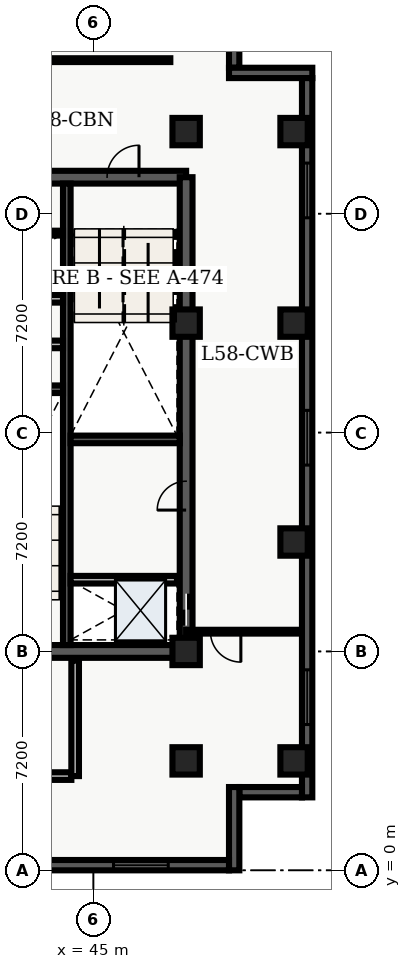
"""IFC4 building model, lengths in metres.
Left out: names, types, materials, properties, quantities, classifications, styles, units other than length and angle.
Written with IfcOpenShell. Run it as: python <this file> out.ifc"""

import sys

from ifc_helpers import new_model, entity, si_unit, converted_unit, direction, frame, origin_with_axes, origin_2d_with_axis, place, context, subcontext, project, spatial, polyline, rectangle, outline, extrude, element, fill, save


model = new_model("IFC4")
c1 = context("Model", 3, precision=1e-05, world=origin_with_axes(), true_north=direction((0.0, 1.0)))
c2 = subcontext(c1, "Body", "Model", "MODEL_VIEW")
j1 = project(units=[si_unit("LENGTHUNIT", "METRE"), converted_unit("PLANEANGLEUNIT", "DEGREE", entity("IfcPlaneAngleMeasure", 0.017), si_unit("PLANEANGLEUNIT", "RADIAN"), dimensions=[0, 0, 0, 0, 0, 0, 0])], contexts=[c1])
p1 = place(None, origin_with_axes())
s1 = spatial("IfcSite", under=j1, at=p1, CompositionType="ELEMENT")
p2 = place(p1, origin_with_axes())
s2 = spatial("IfcBuilding", under=s1, at=p2, CompositionType="ELEMENT")
p3 = place(p2, frame((0.0, 0.0, 236.4), z_axis=(0.0, 0.0, 1.0), x_axis=(1.0, 0.0, 0.0)))
s3 = spatial("IfcBuildingStorey", under=s2, at=p3, CompositionType="ELEMENT", Elevation=236.4)
p4 = place(p3, frame((40.2, 7.2, 0.0), z_axis=(0.0, 0.0, 1.0), x_axis=(1.0, 0.0, 0.0)))
e1 = element("IfcWall", 1, at=p4, inside=s3, PredefinedType="SHEAR", context=c2, shape_type="SweptSolid", body=[
    extrude(outline(polyline([(0.0, -0.21), (7.85, -0.21), (7.85, 0.21), (0.0, 0.21), (0.0, -0.21)])), origin_with_axes(), (0.0, 0.0, 1.0), 3.66),
])
p5 = place(p4, frame((2.175, 0.0, 0.0), z_axis=(0.0, 0.0, 1.0), x_axis=(1.0, 0.0, 0.0)))
e2 = element("IfcOpeningElement", 2, at=p5, cuts=e1, PredefinedType="OPENING", context=c2, shape_type="SweptSolid", body=[
    extrude(rectangle(XDim=1.05, YDim=0.44, at=origin_2d_with_axis()), origin_with_axes(), (0.0, 0.0, 1.0), 2.15),
])
p6 = place(p3, frame((40.2, 22.8, 0.0), z_axis=(0.0, 0.0, 1.0), x_axis=(1.0, 0.0, 0.0)))
e3 = element("IfcWall", 3, at=p6, inside=s3, PredefinedType="SHEAR", context=c2, shape_type="SweptSolid", body=[
    extrude(outline(polyline([(0.0, -0.21), (7.85, -0.21), (7.85, 0.21), (0.0, 0.21), (0.0, -0.21)])), origin_with_axes(), (0.0, 0.0, 1.0), 3.66),
])
p7 = place(p6, frame((5.775, 0.0, 0.0), z_axis=(0.0, 0.0, 1.0), x_axis=(1.0, 0.0, 0.0)))
e4 = element("IfcOpeningElement", 4, at=p7, cuts=e3, PredefinedType="OPENING", context=c2, shape_type="SweptSolid", body=[
    extrude(rectangle(XDim=1.05, YDim=0.44, at=origin_2d_with_axis()), origin_with_axes(), (0.0, 0.0, 1.0), 2.15),
])
p8 = place(p6, frame((2.15, 0.0, 0.0), z_axis=(0.0, 0.0, 1.0), x_axis=(1.0, 0.0, 0.0)))
e5 = element("IfcOpeningElement", 5, at=p8, cuts=e3, PredefinedType="OPENING", context=c2, shape_type="SweptSolid", body=[
    extrude(rectangle(XDim=0.9, YDim=0.44, at=origin_2d_with_axis()), origin_with_axes(), (0.0, 0.0, 1.0), 2.15),
])
p9 = place(p3, frame((48.05, 7.2, 0.0), z_axis=(0.0, 0.0, 1.0), x_axis=(0.0, 1.0, 0.0)))
e6 = element("IfcWall", 6, at=p9, inside=s3, PredefinedType="SHEAR", context=c2, shape_type="SweptSolid", body=[
    extrude(outline(polyline([(0.0, -0.21), (15.6, -0.21), (15.6, 0.21), (0.0, 0.21), (0.0, -0.21)])), origin_with_axes(), (0.0, 0.0, 1.0), 3.66),
])
p10 = place(p9, frame((1.375, 0.0, 0.0), z_axis=(0.0, 0.0, 1.0), x_axis=(1.0, 0.0, 0.0)))
e7 = element("IfcOpeningElement", 7, at=p10, cuts=e6, PredefinedType="OPENING", context=c2, shape_type="SweptSolid", body=[
    extrude(rectangle(XDim=1.05, YDim=0.44, at=origin_2d_with_axis()), origin_with_axes(), (0.0, 0.0, 1.0), 2.15),
])
p11 = place(p9, frame((5.125, 0.0, 0.0), z_axis=(0.0, 0.0, 1.0), x_axis=(1.0, 0.0, 0.0)))
e8 = element("IfcOpeningElement", 8, at=p11, cuts=e6, PredefinedType="OPENING", context=c2, shape_type="SweptSolid", body=[
    extrude(rectangle(XDim=0.95, YDim=0.44, at=origin_2d_with_axis()), origin_with_axes(), (0.0, 0.0, 1.0), 2.15),
])
p12 = place(p3, frame((44.125, 7.41, 0.0), z_axis=(0.0, 0.0, 1.0), x_axis=(0.0, 1.0, 0.0)))
e9 = element("IfcWall", 9, at=p12, inside=s3, PredefinedType="SHEAR", context=c2, shape_type="SweptSolid", body=[
    extrude(outline(polyline([(0.0, -0.125), (15.18, -0.125), (15.18, 0.125), (0.0, 0.125), (0.0, -0.125)])), origin_with_axes(), (0.0, 0.0, 1.0), 3.66),
])
for number, where, z_axis, x_axis in (
    (10, (40.41, 15.825, 0.0), (0.0, 0.0, 1.0), (1.0, 0.0, 0.0)),
    (11, (44.25, 14.175, 0.0), (0.0, 0.0, 1.0), (1.0, 0.0, 0.0)),
):
    element("IfcWall", number, at=place(p3, frame(where, z_axis=z_axis, x_axis=x_axis)), inside=s3, PredefinedType="SHEAR", context=c2, shape_type="SweptSolid", body=[
        extrude(outline(polyline([(0.0, -0.125), (3.59, -0.125), (3.59, 0.125), (0.0, 0.125), (0.0, -0.125)])), origin_with_axes(), (0.0, 0.0, 1.0), 3.66),
    ])
p13 = place(p3, frame((40.5, 17.3, 0.0), z_axis=(0.0, 0.0, 1.0), x_axis=(1.0, 0.0, 0.0)))
e12 = element("IfcWall", 12, at=p13, inside=s3, PredefinedType="SOLIDWALL", context=c2, shape_type="SweptSolid", body=[
    extrude(outline(polyline([(0.0, -0.125), (3.5, -0.125), (3.5, 0.125), (0.0, 0.125), (0.0, -0.125)])), origin_with_axes(), (0.0, 0.0, 1.0), 2.7),
])
p14 = place(p13, frame((2.4, 0.0, 0.0), z_axis=(0.0, 0.0, 1.0), x_axis=(1.0, 0.0, 0.0)))
e13 = element("IfcOpeningElement", 13, at=p14, cuts=e12, PredefinedType="OPENING", context=c2, shape_type="SweptSolid", body=[
    extrude(rectangle(XDim=0.9, YDim=0.27, at=origin_2d_with_axis()), origin_with_axes(), (0.0, 0.0, 1.0), 2.15),
])
p15 = place(p3, frame((40.5, 18.8, 0.0), z_axis=(0.0, 0.0, 1.0), x_axis=(1.0, 0.0, 0.0)))
e14 = element("IfcWall", 14, at=p15, inside=s3, PredefinedType="SOLIDWALL", context=c2, shape_type="SweptSolid", body=[
    extrude(outline(polyline([(0.0, -0.125), (3.5, -0.125), (3.5, 0.125), (0.0, 0.125), (0.0, -0.125)])), origin_with_axes(), (0.0, 0.0, 1.0), 2.7),
])
p16 = place(p3, frame((40.325, 3.1, 0.0), z_axis=(0.0, 0.0, 1.0), x_axis=(1.0, 0.0, 0.0)))
e15 = element("IfcWall", 15, at=p16, inside=s3, PredefinedType="SOLIDWALL", context=c2, shape_type="SweptSolid", body=[
    extrude(outline(polyline([(0.0, -0.125), (3.95, -0.125), (3.95, 0.125), (0.0, 0.125), (0.0, -0.125)])), origin_with_axes(), (0.0, 0.0, 1.0), 2.7),
])
p17 = place(p3, frame((44.4, 3.1, 0.0), z_axis=(0.0, 0.0, 1.0), x_axis=(0.0, 1.0, 0.0)))
e16 = element("IfcWall", 16, at=p17, inside=s3, PredefinedType="SOLIDWALL", context=c2, shape_type="SweptSolid", body=[
    extrude(outline(polyline([(0.0, -0.125), (3.8, -0.125), (3.8, 0.125), (0.0, 0.125), (0.0, -0.125)])), origin_with_axes(), (0.0, 0.0, 1.0), 2.7),
])
for number, where, z_axis, x_axis in (
    (17, (48.05, 3.6, 0.0), (0.0, 0.0, 1.0), (1.0, 0.0, 0.0)),
    (18, (48.05, 7.2, 0.0), (0.0, 0.0, 1.0), (1.0, 0.0, 0.0)),
    (19, (48.05, 18.0, 0.0), (0.0, 0.0, 1.0), (1.0, 0.0, 0.0)),
    (20, (48.05, 24.3, 0.0), (0.0, 0.0, 1.0), (1.0, 0.0, 0.0)),
    (21, (51.6, 3.6, 0.0), (0.0, 0.0, 1.0), (1.0, 0.0, 0.0)),
    (22, (51.6, 10.8, 0.0), (0.0, 0.0, 1.0), (1.0, 0.0, 0.0)),
    (23, (51.6, 18.0, 0.0), (0.0, 0.0, 1.0), (1.0, 0.0, 0.0)),
    (24, (51.6, 24.3, 0.0), (0.0, 0.0, 1.0), (1.0, 0.0, 0.0)),
):
    element("IfcColumn", number, at=place(p3, frame(where, z_axis=z_axis, x_axis=x_axis)), inside=s3, PredefinedType="COLUMN", context=c2, shape_type="SweptSolid", body=[
        extrude(rectangle(XDim=0.9, YDim=0.9, at=origin_2d_with_axis()), origin_with_axes(), (0.0, 0.0, 1.0), 3.9),
    ])
p18 = place(p3, frame((40.5, 20.96, 0.0), z_axis=(0.0, 0.0, 1.0), x_axis=(1.0, 0.0, 0.0)))
e25 = element("IfcWall", 25, at=p18, inside=s3, PredefinedType="PARTITIONING", context=c2, shape_type="SweptSolid", body=[
    extrude(outline(polyline([(0.0, -0.08), (3.5, -0.08), (3.5, 0.08), (0.0, 0.08), (0.0, -0.08)])), origin_with_axes(), (0.0, 0.0, 1.0), 2.7),
])
p19 = place(p3, frame((44.25, 9.56, 0.0), z_axis=(0.0, 0.0, 1.0), x_axis=(1.0, 0.0, 0.0)))
e26 = element("IfcWall", 26, at=p19, inside=s3, PredefinedType="SOLIDWALL", context=c2, shape_type="SweptSolid", body=[
    extrude(outline(polyline([(0.0, -0.125), (3.5, -0.125), (3.5, 0.125), (0.0, 0.125), (0.0, -0.125)])), origin_with_axes(), (0.0, 0.0, 1.0), 2.7),
])
p20 = place(p3, frame((51.865, 7.85, 0.0), z_axis=(0.0, 0.0, 1.0), x_axis=(-1.0, 0.0, 0.0)))
e27 = element("IfcWall", 27, at=p20, inside=s3, PredefinedType="PARTITIONING", context=c2, shape_type="SweptSolid", body=[
    extrude(outline(polyline([(0.0, -0.062), (3.815, -0.062), (3.815, 0.062), (0.0, 0.062), (0.0, -0.062)])), origin_with_axes(), (0.0, 0.0, 1.0), 2.7),
])
p21 = place(p20, frame((2.515, 0.0, 0.0), z_axis=(0.0, 0.0, 1.0), x_axis=(1.0, 0.0, 0.0)))
e28 = element("IfcOpeningElement", 28, at=p21, cuts=e27, PredefinedType="OPENING", context=c2, shape_type="SweptSolid", body=[
    extrude(rectangle(XDim=1.0, YDim=0.145, at=origin_2d_with_axis()), origin_with_axes(), (0.0, 0.0, 1.0), 2.15),
])
p22 = place(p3, frame((36.335, 26.65, 0.0), z_axis=(0.0, 0.0, 1.0), x_axis=(1.0, 0.0, 0.0)))
e29 = element("IfcWall", 29, at=p22, inside=s3, PredefinedType="PARTITIONING", context=c2, shape_type="SweptSolid", body=[
    extrude(outline(polyline([(0.0, -0.062), (11.195, -0.062), (11.195, 0.062), (0.0, 0.062), (0.0, -0.062)])), origin_with_axes(), (0.0, 0.0, 1.0), 2.7),
])
p23 = place(p22, frame((6.665, 0.0, 0.0), z_axis=(0.0, 0.0, 1.0), x_axis=(1.0, 0.0, 0.0)))
e30 = element("IfcOpeningElement", 30, at=p23, cuts=e29, PredefinedType="OPENING", context=c2, shape_type="SweptSolid", body=[
    extrude(rectangle(XDim=1.0, YDim=0.145, at=origin_2d_with_axis()), origin_with_axes(), (0.0, 0.0, 1.0), 2.15),
])
p24 = place(p3, frame((49.63, 28.46, 0.0), z_axis=(0.0, 0.0, 1.0), x_axis=(0.0, -1.0, 0.0)))
e31 = element("IfcWall", 31, at=p24, inside=s3, PredefinedType="SOLIDWALL", context=c2, shape_type="SweptSolid", body=[
    extrude(outline(polyline([(0.0, -0.17), (2.06, -0.17), (2.06, 0.17), (0.0, 0.17), (0.0, -0.17)])), origin_with_axes(), (0.0, 0.0, 1.0), 3.66),
])
p25 = place(p3, frame((49.46, 26.23, 0.0), z_axis=(0.0, 0.0, 1.0), x_axis=(1.0, 0.0, 0.0)))
e32 = element("IfcWall", 32, at=p25, inside=s3, PredefinedType="SOLIDWALL", context=c2, shape_type="SweptSolid", body=[
    extrude(outline(polyline([(0.0, -0.17), (2.74, -0.17), (2.74, 0.17), (0.0, 0.17), (0.0, -0.17)])), origin_with_axes(), (0.0, 0.0, 1.0), 3.66),
])
p26 = place(p3, frame((52.03, 26.06, 0.0), z_axis=(0.0, 0.0, 1.0), x_axis=(0.0, -1.0, 0.0)))
e33 = element("IfcWall", 33, at=p26, inside=s3, PredefinedType="SOLIDWALL", context=c2, shape_type="SweptSolid", body=[
    extrude(outline(polyline([(0.0, -0.17), (23.66, -0.17), (23.66, 0.17), (0.0, 0.17), (0.0, -0.17)])), origin_with_axes(), (0.0, 0.0, 1.0), 3.66),
])
p27 = place(p26, frame((3.696, 0.0, 0.45), z_axis=(0.0, 0.0, 1.0), x_axis=(1.0, 0.0, 0.0)))
e34 = element("IfcOpeningElement", 34, at=p27, cuts=e33, PredefinedType="OPENING", context=c2, shape_type="SweptSolid", body=[
    extrude(rectangle(XDim=1.8, YDim=0.36, at=origin_2d_with_axis()), origin_with_axes(), (0.0, 0.0, 1.0), 2.1),
])
p28 = place(p26, frame((11.83, 0.0, 0.45), z_axis=(0.0, 0.0, 1.0), x_axis=(1.0, 0.0, 0.0)))
e35 = element("IfcOpeningElement", 35, at=p28, cuts=e33, PredefinedType="OPENING", context=c2, shape_type="SweptSolid", body=[
    extrude(rectangle(XDim=1.8, YDim=0.36, at=origin_2d_with_axis()), origin_with_axes(), (0.0, 0.0, 1.0), 2.1),
])
p29 = place(p26, frame((20.364, 0.0, 0.45), z_axis=(0.0, 0.0, 1.0), x_axis=(1.0, 0.0, 0.0)))
e36 = element("IfcOpeningElement", 36, at=p29, cuts=e33, PredefinedType="OPENING", context=c2, shape_type="SweptSolid", body=[
    extrude(rectangle(XDim=1.8, YDim=0.36, at=origin_2d_with_axis()), origin_with_axes(), (0.0, 0.0, 1.0), 2.1),
])
p30 = place(p3, frame((51.86, 2.57, 0.0), z_axis=(0.0, 0.0, 1.0), x_axis=(-1.0, 0.0, 0.0)))
e37 = element("IfcWall", 37, at=p30, inside=s3, PredefinedType="SOLIDWALL", context=c2, shape_type="SweptSolid", body=[
    extrude(outline(polyline([(0.0, -0.17), (2.06, -0.17), (2.06, 0.17), (0.0, 0.17), (0.0, -0.17)])), origin_with_axes(), (0.0, 0.0, 1.0), 3.66),
])
p31 = place(p3, frame((49.63, 2.74, 0.0), z_axis=(0.0, 0.0, 1.0), x_axis=(0.0, -1.0, 0.0)))
e38 = element("IfcWall", 38, at=p31, inside=s3, PredefinedType="SOLIDWALL", context=c2, shape_type="SweptSolid", body=[
    extrude(outline(polyline([(0.0, -0.17), (2.74, -0.17), (2.74, 0.17), (0.0, 0.17), (0.0, -0.17)])), origin_with_axes(), (0.0, 0.0, 1.0), 3.66),
])
p32 = place(p3, frame((49.46, 0.17, 0.0), z_axis=(0.0, 0.0, 1.0), x_axis=(-1.0, 0.0, 0.0)))
e39 = element("IfcWall", 39, at=p32, inside=s3, PredefinedType="SOLIDWALL", context=c2, shape_type="SweptSolid", body=[
    extrude(outline(polyline([(0.0, -0.17), (42.56, -0.17), (42.56, 0.17), (0.0, 0.17), (0.0, -0.17)])), origin_with_axes(), (0.0, 0.0, 1.0), 3.66),
])
p33 = place(p32, frame((2.898, 0.0, 0.45), z_axis=(0.0, 0.0, 1.0), x_axis=(1.0, 0.0, 0.0)))
e40 = element("IfcOpeningElement", 40, at=p33, cuts=e39, PredefinedType="OPENING", context=c2, shape_type="SweptSolid", body=[
    extrude(rectangle(XDim=1.8, YDim=0.36, at=origin_2d_with_axis()), origin_with_axes(), (0.0, 0.0, 1.0), 2.1),
])
p34 = place(p32, frame((7.493, 0.0, 0.45), z_axis=(0.0, 0.0, 1.0), x_axis=(1.0, 0.0, 0.0)))
e41 = element("IfcOpeningElement", 41, at=p34, cuts=e39, PredefinedType="OPENING", context=c2, shape_type="SweptSolid", body=[
    extrude(rectangle(XDim=1.8, YDim=0.36, at=origin_2d_with_axis()), origin_with_axes(), (0.0, 0.0, 1.0), 2.1),
])
p35 = place(p32, frame((12.089, 0.0, 0.45), z_axis=(0.0, 0.0, 1.0), x_axis=(1.0, 0.0, 0.0)))
e42 = element("IfcOpeningElement", 42, at=p35, cuts=e39, PredefinedType="OPENING", context=c2, shape_type="SweptSolid", body=[
    extrude(rectangle(XDim=1.8, YDim=0.36, at=origin_2d_with_axis()), origin_with_axes(), (0.0, 0.0, 1.0), 2.1),
])
p36 = place(p32, frame((16.234, 0.0, 0.45), z_axis=(0.0, 0.0, 1.0), x_axis=(1.0, 0.0, 0.0)))
e43 = element("IfcOpeningElement", 43, at=p36, cuts=e39, PredefinedType="OPENING", context=c2, shape_type="SweptSolid", body=[
    extrude(rectangle(XDim=1.8, YDim=0.36, at=origin_2d_with_axis()), origin_with_axes(), (0.0, 0.0, 1.0), 2.1),
])
p37 = place(p32, frame((25.876, 0.0, 0.45), z_axis=(0.0, 0.0, 1.0), x_axis=(1.0, 0.0, 0.0)))
e44 = element("IfcOpeningElement", 44, at=p37, cuts=e39, PredefinedType="OPENING", context=c2, shape_type="SweptSolid", body=[
    extrude(rectangle(XDim=1.8, YDim=0.36, at=origin_2d_with_axis()), origin_with_axes(), (0.0, 0.0, 1.0), 2.1),
])
p38 = place(p32, frame((30.471, 0.0, 0.45), z_axis=(0.0, 0.0, 1.0), x_axis=(1.0, 0.0, 0.0)))
e45 = element("IfcOpeningElement", 45, at=p38, cuts=e39, PredefinedType="OPENING", context=c2, shape_type="SweptSolid", body=[
    extrude(rectangle(XDim=1.8, YDim=0.36, at=origin_2d_with_axis()), origin_with_axes(), (0.0, 0.0, 1.0), 2.1),
])
p39 = place(p32, frame((35.067, 0.0, 0.45), z_axis=(0.0, 0.0, 1.0), x_axis=(1.0, 0.0, 0.0)))
e46 = element("IfcOpeningElement", 46, at=p39, cuts=e39, PredefinedType="OPENING", context=c2, shape_type="SweptSolid", body=[
    extrude(rectangle(XDim=1.8, YDim=0.36, at=origin_2d_with_axis()), origin_with_axes(), (0.0, 0.0, 1.0), 2.1),
])
p40 = place(p32, frame((39.662, 0.0, 0.45), z_axis=(0.0, 0.0, 1.0), x_axis=(1.0, 0.0, 0.0)))
e47 = element("IfcOpeningElement", 47, at=p40, cuts=e39, PredefinedType="OPENING", context=c2, shape_type="SweptSolid", body=[
    extrude(rectangle(XDim=1.8, YDim=0.36, at=origin_2d_with_axis()), origin_with_axes(), (0.0, 0.0, 1.0), 2.1),
])
p41 = place(p9, frame((1.375, 0.0, 0.0), z_axis=(0.0, 0.0, 1.0), x_axis=(1.0, 0.0, 0.0)))
e48 = element("IfcDoor", 48, at=p41, inside=s3, OperationType="SLIDING_TO_LEFT", PredefinedType="DOOR", context=c2, shape_type="SweptSolid", body=[
    extrude(rectangle(XDim=1.05, YDim=0.09, at=origin_2d_with_axis()), origin_with_axes(), (0.0, 0.0, 1.0), 2.15),
])
fill(e7, e48)
p42 = place(p6, frame((5.775, 0.0, 0.0), z_axis=(0.0, 0.0, 1.0), x_axis=(1.0, 0.0, 0.0)))
e49 = element("IfcDoor", 49, at=p42, inside=s3, OperationType="SINGLE_SWING_RIGHT", PredefinedType="DOOR", context=c2, shape_type="SweptSolid", body=[
    extrude(rectangle(XDim=1.05, YDim=0.09, at=origin_2d_with_axis()), origin_with_axes(), (0.0, 0.0, 1.0), 2.15),
])
fill(e4, e49)
p43 = place(p9, frame((5.125, 0.0, 0.0), z_axis=(0.0, 0.0, 1.0), x_axis=(1.0, 0.0, 0.0)))
e50 = element("IfcDoor", 50, at=p43, inside=s3, OperationType="SINGLE_SWING_LEFT", PredefinedType="DOOR", context=c2, shape_type="SweptSolid", body=[
    extrude(rectangle(XDim=0.95, YDim=0.09, at=origin_2d_with_axis()), origin_with_axes(), (0.0, 0.0, 1.0), 2.15),
])
fill(e8, e50)
p44 = place(p20, frame((2.515, 0.0, 0.0), z_axis=(0.0, 0.0, 1.0), x_axis=(1.0, 0.0, 0.0)))
e51 = element("IfcDoor", 51, at=p44, inside=s3, OperationType="SINGLE_SWING_LEFT", PredefinedType="DOOR", context=c2, shape_type="SweptSolid", body=[
    extrude(rectangle(XDim=1.0, YDim=0.075, at=origin_2d_with_axis()), origin_with_axes(), (0.0, 0.0, 1.0), 2.15),
])
fill(e28, e51)
p45 = place(p26, frame((3.696, 0.0, 0.45), z_axis=(0.0, 0.0, 1.0), x_axis=(1.0, 0.0, 0.0)))
e52 = element("IfcWindow", 52, at=p45, inside=s3, PredefinedType="WINDOW", context=c2, shape_type="SweptSolid", body=[
    extrude(rectangle(XDim=1.8, YDim=0.09, at=origin_2d_with_axis()), origin_with_axes(), (0.0, 0.0, 1.0), 2.1),
])
fill(e34, e52)
p46 = place(p26, frame((11.83, 0.0, 0.45), z_axis=(0.0, 0.0, 1.0), x_axis=(1.0, 0.0, 0.0)))
e53 = element("IfcWindow", 53, at=p46, inside=s3, PredefinedType="WINDOW", context=c2, shape_type="SweptSolid", body=[
    extrude(rectangle(XDim=1.8, YDim=0.09, at=origin_2d_with_axis()), origin_with_axes(), (0.0, 0.0, 1.0), 2.1),
])
fill(e35, e53)
p47 = place(p26, frame((20.364, 0.0, 0.45), z_axis=(0.0, 0.0, 1.0), x_axis=(1.0, 0.0, 0.0)))
e54 = element("IfcWindow", 54, at=p47, inside=s3, PredefinedType="WINDOW", context=c2, shape_type="SweptSolid", body=[
    extrude(rectangle(XDim=1.8, YDim=0.09, at=origin_2d_with_axis()), origin_with_axes(), (0.0, 0.0, 1.0), 2.1),
])
fill(e36, e54)
p48 = place(p32, frame((2.898, 0.0, 0.45), z_axis=(0.0, 0.0, 1.0), x_axis=(1.0, 0.0, 0.0)))
e55 = element("IfcWindow", 55, at=p48, inside=s3, PredefinedType="WINDOW", context=c2, shape_type="SweptSolid", body=[
    extrude(rectangle(XDim=1.8, YDim=0.09, at=origin_2d_with_axis()), origin_with_axes(), (0.0, 0.0, 1.0), 2.1),
])
fill(e40, e55)
save(model, sys.argv[1])
